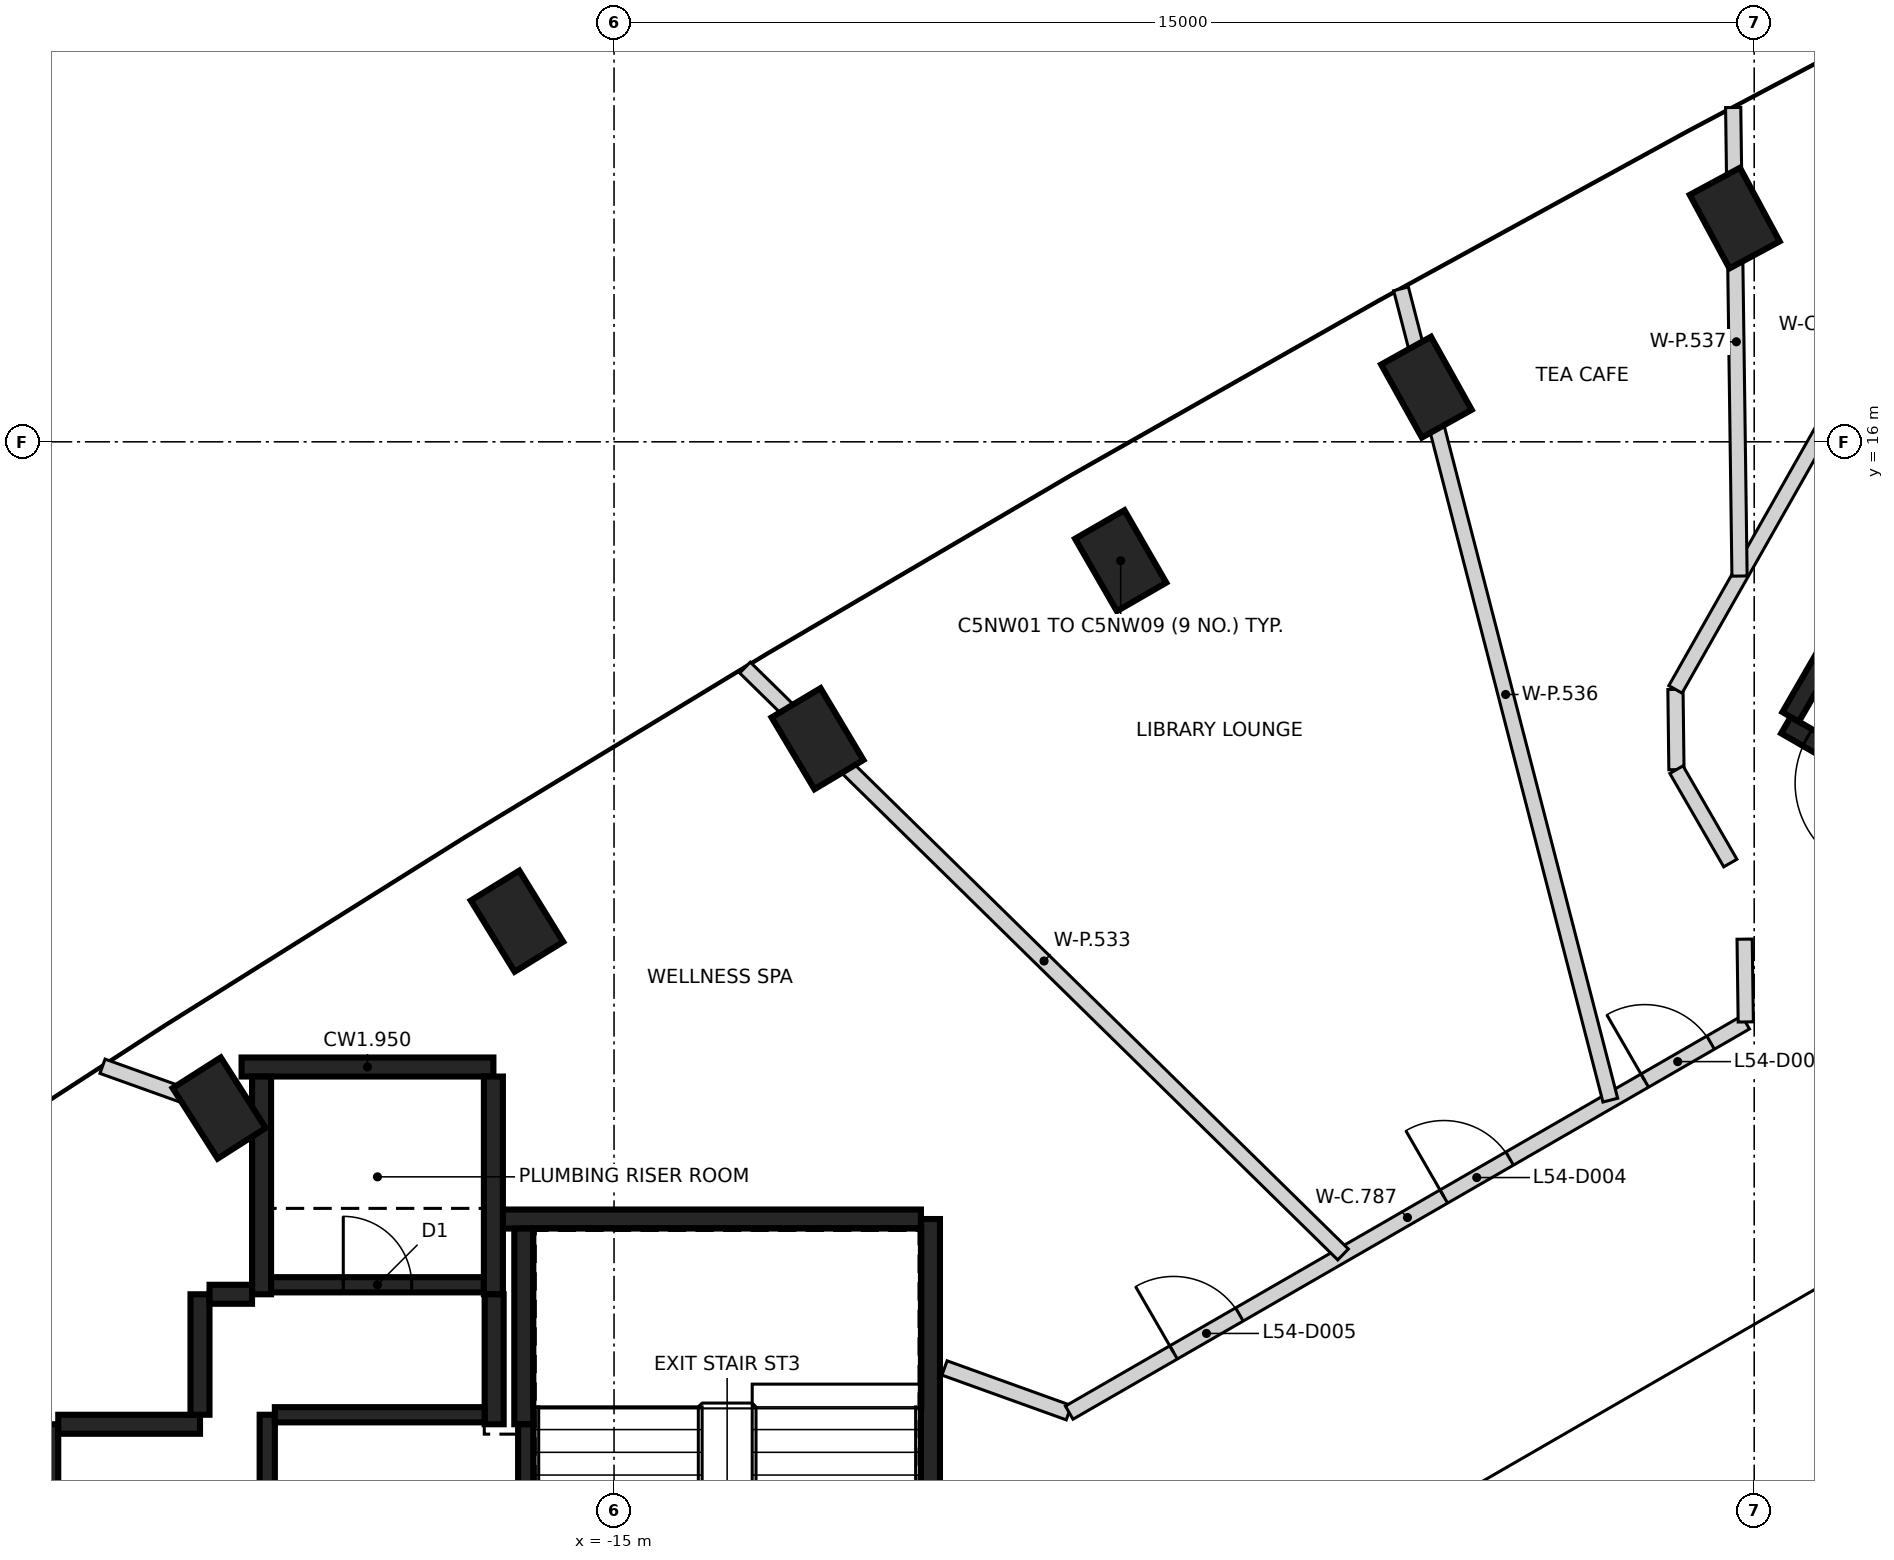
"""IFC4 building model, lengths in metres.
Left out: names, types, materials, properties, quantities, classifications, styles, units other than length and angle.
Written with IfcOpenShell. Run it as: python <this file> out.ifc"""

import sys

from ifc_helpers import new_model, si_unit, direction, frame, frame_2d, origin, origin_2d, place, context, subcontext, project, spatial, rectangle, extrude, element, fill, save


model = new_model("IFC4")
c1 = context("Model", 3, precision=1e-05, world=origin(), true_north=direction((0.0, 1.0)))
c2 = subcontext(c1, "Body", "Model", "MODEL_VIEW")
j1 = project(units=[si_unit("LENGTHUNIT", "METRE"), si_unit("PLANEANGLEUNIT", "RADIAN")], contexts=[c1])
p1 = place(None, origin())
s1 = spatial("IfcSite", under=j1, at=p1, CompositionType="ELEMENT")
p2 = place(p1, origin())
s2 = spatial("IfcBuilding", under=s1, at=p2, CompositionType="ELEMENT")
p3 = place(p2, frame((0.0, 0.0, 216.4)))
s3 = spatial("IfcBuildingStorey", under=s2, at=p3, CompositionType="ELEMENT", Elevation=216.4)
for number, where, z_axis, x_axis in (
    (1, (-0.256, 18.943, -0.35), (0.0, 0.0, 1.0), (-0.475, 0.88, 0.0)),
    (2, (-4.312, 16.719, -0.35), (0.0, 0.0, 1.0), (-0.487, 0.873, 0.0)),
    (3, (-8.335, 14.436, -0.35), (0.0, 0.0, 1.0), (-0.5, 0.866, 0.0)),
    (4, (-12.323, 12.094, -0.35), (0.0, 0.0, 1.0), (-0.513, 0.858, 0.0)),
    (5, (-16.277, 9.693, -0.35), (0.0, 0.0, 1.0), (-0.525, 0.851, 0.0)),
    (6, (-20.195, 7.235, -0.35), (0.0, 0.0, 1.0), (-0.538, 0.843, 0.0)),
):
    element("IfcColumn", number, at=place(p3, frame(where, z_axis=z_axis, x_axis=x_axis)), inside=s3, PredefinedType="COLUMN", context=c2, shape_type="SweptSolid", body=[
        extrude(rectangle(XDim=1.1, YDim=0.75, at=origin_2d()), origin(), (0.0, 0.0, 1.0), 5.0),
    ])
p4 = place(p3, frame((-10.837, 5.775, 0.0), z_axis=(0.0, 0.0, 1.0), x_axis=(0.0, -1.0, 0.0)))
e7 = element("IfcWall", 7, at=p4, inside=s3, PredefinedType="SHEAR", context=c2, shape_type="SweptSolid", body=[
    extrude(rectangle(XDim=11.55, YDim=0.25, at=frame_2d((5.775, 0.0))), origin(), (0.0, 0.0, 1.0), 4.65),
])
p5 = place(p4, frame((10.025, 0.0, 0.0)))
e8 = element("IfcOpeningElement", 8, at=p5, cuts=e7, PredefinedType="OPENING", context=c2, shape_type="SweptSolid", body=[
    extrude(rectangle(XDim=1.2, YDim=2.1, at=frame_2d((0.6, 1.05))), frame((0.0, 0.135, 0.0), z_axis=(0.0, -1.0, 0.0), x_axis=(1.0, 0.0, 0.0)), (0.0, 0.0, 1.0), 0.27),
])
p6 = place(p4, frame((8.725, 0.0, 0.0)))
e9 = element("IfcOpeningElement", 9, at=p6, cuts=e7, PredefinedType="OPENING", context=c2, shape_type="SweptSolid", body=[
    extrude(rectangle(XDim=1.2, YDim=2.1, at=frame_2d((0.6, 1.05))), frame((0.0, 0.135, 0.0), z_axis=(0.0, -1.0, 0.0), x_axis=(1.0, 0.0, 0.0)), (0.0, 0.0, 1.0), 0.27),
])
p7 = place(p3, frame((-22.437, -5.675, 0.0), z_axis=(0.0, 0.0, 1.0), x_axis=(0.0, 1.0, 0.0)))
e10 = element("IfcWall", 10, at=p7, inside=s3, PredefinedType="SHEAR", context=c2, shape_type="SweptSolid", body=[
    extrude(rectangle(XDim=8.75, YDim=0.25, at=frame_2d((4.375, 0.0))), origin(), (0.0, 0.0, 1.0), 4.65),
])
p8 = place(p3, frame((-16.472, 5.775, 0.0), z_axis=(0.0, 0.0, 1.0), x_axis=(1.0, 0.0, 0.0)))
e11 = element("IfcWall", 11, at=p8, inside=s3, PredefinedType="SHEAR", context=c2, shape_type="SweptSolid", body=[
    extrude(rectangle(XDim=5.51, YDim=0.25, at=frame_2d((2.755, 0.0))), origin(), (0.0, 0.0, 1.0), 4.65),
])
p9 = place(p3, frame((-19.9, 7.775, 0.0), z_axis=(0.0, 0.0, 1.0), x_axis=(1.0, 0.0, 0.0)))
e12 = element("IfcWall", 12, at=p9, inside=s3, PredefinedType="SHEAR", context=c2, shape_type="SweptSolid", body=[
    extrude(rectangle(XDim=3.313, YDim=0.25, at=frame_2d((1.656, 0.0))), origin(), (0.0, 0.0, 1.0), 4.65),
])
for number, where, z_axis, x_axis in (
    (13, (-16.587, 7.65, 0.0), (0.0, 0.0, 1.0), (0.0, -1.0, 0.0)),
    (14, (-19.637, 4.785, 0.0), (0.0, 0.0, 1.0), (0.0, 1.0, 0.0)),
):
    element("IfcWall", number, at=place(p3, frame(where, z_axis=z_axis, x_axis=x_axis)), inside=s3, PredefinedType="SHEAR", context=c2, shape_type="SweptSolid", body=[
        extrude(rectangle(XDim=2.865, YDim=0.25, at=frame_2d((1.432, 0.0))), origin(), (0.0, 0.0, 1.0), 4.65),
    ])
p10 = place(p3, frame((-16.187, 3.075, 0.0), z_axis=(0.0, 0.0, 1.0), x_axis=(0.0, 1.0, 0.0)))
e15 = element("IfcWall", 15, at=p10, inside=s3, PredefinedType="SHEAR", context=c2, shape_type="SweptSolid", body=[
    extrude(rectangle(XDim=2.575, YDim=0.25, at=frame_2d((1.287, 0.0))), origin(), (0.0, 0.0, 1.0), 4.65),
])
p11 = place(p3, frame((-22.312, 3.075, 0.0), z_axis=(0.0, 0.0, 1.0), x_axis=(1.0, 0.0, 0.0)))
e16 = element("IfcWall", 16, at=p11, inside=s3, PredefinedType="SHEAR", context=c2, shape_type="SweptSolid", body=[
    extrude(rectangle(XDim=1.865, YDim=0.25, at=frame_2d((0.932, 0.0))), origin(), (0.0, 0.0, 1.0), 4.65),
])
p12 = place(p3, frame((-16.577, 4.785, 0.0), z_axis=(0.0, 0.0, 1.0), x_axis=(0.0, -1.0, 0.0)))
e17 = element("IfcWall", 17, at=p12, inside=s3, PredefinedType="SHEAR", context=c2, shape_type="SweptSolid", body=[
    extrude(rectangle(XDim=1.71, YDim=0.25, at=frame_2d((0.855, 0.0))), origin(), (0.0, 0.0, 1.0), 4.65),
])
p13 = place(p3, frame((-20.447, 3.2, 0.0), z_axis=(0.0, 0.0, 1.0), x_axis=(0.0, 1.0, 0.0)))
e18 = element("IfcWall", 18, at=p13, inside=s3, PredefinedType="SHEAR", context=c2, shape_type="SweptSolid", body=[
    extrude(rectangle(XDim=1.584, YDim=0.25, at=frame_2d((0.792, 0.0))), origin(), (0.0, 0.0, 1.0), 4.65),
])
p14 = place(p3, frame((-20.322, 4.785, 0.0), z_axis=(0.0, 0.0, 1.0), x_axis=(1.0, 0.0, 0.0)))
e19 = element("IfcWall", 19, at=p14, inside=s3, PredefinedType="SHEAR", context=c2, shape_type="SweptSolid", body=[
    extrude(rectangle(XDim=0.559, YDim=0.25, at=frame_2d((0.28, 0.0))), origin(), (0.0, 0.0, 1.0), 4.65),
])
p15 = place(p3, frame((-16.162, 3.074, 0.0), z_axis=(0.0, 0.0, 1.0), x_axis=(0.0, -1.0, 0.0)))
e20 = element("IfcWall", 20, at=p15, inside=s3, PredefinedType="SHEAR", context=c2, shape_type="SweptSolid", body=[
    extrude(rectangle(XDim=5.974, YDim=0.2, at=frame_2d((2.987, 0.0))), origin(), (0.0, 0.0, 1.0), 4.65),
])
p16 = place(p3, frame((-19.562, -2.9, 0.0), z_axis=(0.0, 0.0, 1.0), x_axis=(0.0, 1.0, 0.0)))
e21 = element("IfcWall", 21, at=p16, inside=s3, PredefinedType="SHEAR", context=c2, shape_type="SweptSolid", body=[
    extrude(rectangle(XDim=6.1, YDim=0.2, at=frame_2d((3.05, 0.0))), origin(), (0.0, 0.0, 1.0), 4.65),
])
p17 = place(p3, frame((-19.511, 4.91, 0.0), z_axis=(0.0, 0.0, 1.0), x_axis=(1.0, 0.0, 0.0)))
e22 = element("IfcWall", 22, at=p17, inside=s3, PredefinedType="SHEAR", context=c2, shape_type="SweptSolid", body=[
    extrude(rectangle(XDim=2.798, YDim=0.2, at=frame_2d((1.399, 0.0))), origin(), (0.0, 0.0, 1.0), 4.65),
])
p18 = place(p17, frame((0.949, 0.0, 0.0)))
e23 = element("IfcOpeningElement", 23, at=p18, cuts=e22, PredefinedType="OPENING", context=c2, shape_type="SweptSolid", body=[
    extrude(rectangle(XDim=0.9, YDim=2.1, at=frame_2d((0.45, 1.05))), frame((0.0, 0.11, 0.0), z_axis=(0.0, -1.0, 0.0), x_axis=(1.0, 0.0, 0.0)), (0.0, 0.0, 1.0), 0.22),
])
p19 = place(p3, frame((-19.462, 3.2, 0.0), z_axis=(0.0, 0.0, 1.0), x_axis=(1.0, 0.0, 0.0)))
e24 = element("IfcWall", 24, at=p19, inside=s3, PredefinedType="SHEAR", context=c2, shape_type="SweptSolid", body=[
    extrude(rectangle(XDim=2.759, YDim=0.2, at=frame_2d((1.379, 0.0))), origin(), (0.0, 0.0, 1.0), 4.65),
])
p20 = place(p3, frame((10.42, 6.498, 0.0), z_axis=(0.0, 0.0, 1.0), x_axis=(-0.866021906294, 0.500006057782, 0.0)))
e25 = element("IfcWall", 25, at=p20, inside=s3, PredefinedType="SHEAR", context=c2, shape_type="SweptSolid", body=[
    extrude(rectangle(XDim=11.55, YDim=0.25, at=frame_2d((5.775, 0.0))), origin(), (0.0, 0.0, 1.0), 4.65),
])
p21 = place(p20, frame((10.025, 0.0, 0.0)))
e26 = element("IfcOpeningElement", 26, at=p21, cuts=e25, PredefinedType="OPENING", context=c2, shape_type="SweptSolid", body=[
    extrude(rectangle(XDim=1.2, YDim=2.1, at=frame_2d((0.6, 1.05))), frame((0.0, 0.135, 0.0), z_axis=(0.0, -1.0, 0.0), x_axis=(1.0, 0.0, 0.0)), (0.0, 0.0, 1.0), 0.27),
])
p22 = place(p20, frame((8.725, 0.0, 0.0)))
e27 = element("IfcOpeningElement", 27, at=p22, cuts=e25, PredefinedType="OPENING", context=c2, shape_type="SweptSolid", body=[
    extrude(rectangle(XDim=1.2, YDim=2.1, at=frame_2d((0.6, 1.05))), frame((0.0, 0.135, 0.0), z_axis=(0.0, -1.0, 0.0), x_axis=(1.0, 0.0, 0.0)), (0.0, 0.0, 1.0), 0.27),
])
p23 = place(p3, frame((0.48, 12.381, 0.0), z_axis=(0.0, 0.0, 1.0), x_axis=(0.49999885962, 0.866026062182, 0.0)))
e28 = element("IfcWall", 28, at=p23, inside=s3, PredefinedType="SHEAR", context=c2, shape_type="SweptSolid", body=[
    extrude(rectangle(XDim=5.225, YDim=0.25, at=frame_2d((2.612, 0.0))), origin(), (0.0, 0.0, 1.0), 4.65),
])
p24 = place(p3, frame((-10.652, 3.816, 0.0), z_axis=(0.0, 0.0, 1.0), x_axis=(0.940899946508, -0.33868464781, 0.0)))
e29 = element("IfcWall", 29, at=p24, inside=s3, PredefinedType="PARTITIONING", context=c2, shape_type="SweptSolid", body=[
    extrude(rectangle(XDim=1.738, YDim=0.2, at=frame_2d((0.869, 0.0))), origin(), (0.0, 0.0, 1.0), 4.65),
])
p25 = place(p3, frame((-9.012, 3.228, 0.0), z_axis=(0.0, 0.0, 1.0), x_axis=(0.866203386391, 0.499691598294, 0.0)))
e30 = element("IfcWall", 30, at=p25, inside=s3, PredefinedType="PARTITIONING", context=c2, shape_type="SweptSolid", body=[
    extrude(rectangle(XDim=10.275, YDim=0.2, at=frame_2d((5.137, 0.0))), origin(), (0.0, 0.0, 1.0), 4.65),
])
p26 = place(p25, frame((8.742, 0.0, 0.0)))
e31 = element("IfcOpeningElement", 31, at=p26, cuts=e30, PredefinedType="OPENING", context=c2, shape_type="SweptSolid", body=[
    extrude(rectangle(XDim=1.0, YDim=2.1, at=frame_2d((0.5, 1.05))), frame((0.0, 0.11, 0.0), z_axis=(0.0, -1.0, 0.0), x_axis=(1.0, 0.0, 0.0)), (0.0, 0.0, 1.0), 0.22),
])
p27 = place(p25, frame((5.69, 0.0, 0.0)))
e32 = element("IfcOpeningElement", 32, at=p27, cuts=e30, PredefinedType="OPENING", context=c2, shape_type="SweptSolid", body=[
    extrude(rectangle(XDim=1.0, YDim=2.1, at=frame_2d((0.5, 1.05))), frame((0.0, 0.11, 0.0), z_axis=(0.0, -1.0, 0.0), x_axis=(1.0, 0.0, 0.0)), (0.0, 0.0, 1.0), 0.22),
])
p28 = place(p25, frame((1.585, 0.0, 0.0)))
e33 = element("IfcOpeningElement", 33, at=p28, cuts=e30, PredefinedType="OPENING", context=c2, shape_type="SweptSolid", body=[
    extrude(rectangle(XDim=1.0, YDim=2.1, at=frame_2d((0.5, 1.05))), frame((0.0, 0.11, 0.0), z_axis=(0.0, -1.0, 0.0), x_axis=(1.0, 0.0, 0.0)), (0.0, 0.0, 1.0), 0.22),
])
p29 = place(p3, frame((-1.036, 12.743, 0.0), z_axis=(0.0, 0.0, 1.0), x_axis=(0.012253415255, -0.999924924089, 0.0)))
e34 = element("IfcWall", 34, at=p29, inside=s3, PredefinedType="PARTITIONING", context=c2, shape_type="SweptSolid", body=[
    extrude(rectangle(XDim=1.056, YDim=0.2, at=frame_2d((0.528, 0.0))), origin(), (0.0, 0.0, 1.0), 4.65),
])
p30 = place(p3, frame((-1.036, 12.743, 0.0), z_axis=(0.0, 0.0, 1.0), x_axis=(0.49314672747, 0.869946150739, 0.0)))
e35 = element("IfcWall", 35, at=p30, inside=s3, PredefinedType="PARTITIONING", context=c2, shape_type="SweptSolid", body=[
    extrude(rectangle(XDim=10.423, YDim=0.2, at=frame_2d((5.211, 0.0))), origin(), (0.0, 0.0, 1.0), 3.75),
])
p31 = place(p30, frame((5.612, 0.0, 0.0)))
e36 = element("IfcOpeningElement", 36, at=p31, cuts=e35, PredefinedType="OPENING", context=c2, shape_type="SweptSolid", body=[
    extrude(rectangle(XDim=0.9, YDim=2.1, at=frame_2d((0.45, 1.05))), frame((0.0, 0.11, 0.0), z_axis=(0.0, -1.0, 0.0), x_axis=(1.0, 0.0, 0.0)), (0.0, 0.0, 1.0), 0.22),
])
p32 = place(p3, frame((-1.023, 11.687, 0.0), z_axis=(0.0, 0.0, 1.0), x_axis=(0.499692660748, -0.866202773486, 0.0)))
e37 = element("IfcWall", 37, at=p32, inside=s3, PredefinedType="PARTITIONING", context=c2, shape_type="SweptSolid", body=[
    extrude(rectangle(XDim=1.419, YDim=0.2, at=frame_2d((0.709, 0.0))), origin(), (0.0, 0.0, 1.0), 4.65),
])
p33 = place(p3, frame((-0.126, 9.457, 0.0), z_axis=(0.0, 0.0, 1.0), x_axis=(0.013672785902, -0.999906523094, 0.0)))
e38 = element("IfcWall", 38, at=p33, inside=s3, PredefinedType="PARTITIONING", context=c2, shape_type="SweptSolid", body=[
    extrude(rectangle(XDim=1.089, YDim=0.2, at=frame_2d((0.544, 0.0))), origin(), (0.0, 0.0, 1.0), 4.65),
])
p34 = place(p3, frame((-21.73, 7.785, 0.0), z_axis=(0.0, 0.0, 1.0), x_axis=(0.941449854418, -0.337153038866, 0.0)))
e39 = element("IfcWall", 39, at=p34, inside=s3, PredefinedType="PARTITIONING", context=c2, shape_type="SweptSolid", body=[
    extrude(rectangle(XDim=2.026, YDim=0.2, at=frame_2d((1.013, 0.0))), origin(), (0.0, 0.0, 1.0), 4.65),
])
p35 = place(p3, frame((-13.277, 13.03, 0.0), z_axis=(0.0, 0.0, 1.0), x_axis=(0.713763428774, -0.700386870054, 0.0)))
e40 = element("IfcWall", 40, at=p35, inside=s3, PredefinedType="PARTITIONING", context=c2, shape_type="SweptSolid", body=[
    extrude(rectangle(XDim=11.024, YDim=0.2, at=frame_2d((5.512, 0.0))), origin(), (0.0, 0.0, 1.0), 4.65),
])
p36 = place(p3, frame((-4.646, 18.013, 0.0), z_axis=(0.0, 0.0, 1.0), x_axis=(0.249782901113, -0.968301865283, 0.0)))
e41 = element("IfcWall", 41, at=p36, inside=s3, PredefinedType="PARTITIONING", context=c2, shape_type="SweptSolid", body=[
    extrude(rectangle(XDim=11.023, YDim=0.2, at=frame_2d((5.512, 0.0))), origin(), (0.0, 0.0, 1.0), 4.65),
])
p37 = place(p3, frame((-0.276, 20.398, 0.0), z_axis=(0.0, 0.0, 1.0), x_axis=(0.013504253847, -0.999908813407, 0.0)))
e42 = element("IfcWall", 42, at=p37, inside=s3, PredefinedType="PARTITIONING", context=c2, shape_type="SweptSolid", body=[
    extrude(rectangle(XDim=6.165, YDim=0.2, at=frame_2d((3.083, 0.0))), origin(), (0.0, 0.0, 1.0), 4.65),
])
p38 = place(p18, origin())
e43 = element("IfcDoor", 43, at=p38, inside=s3, OperationType="SINGLE_SWING_LEFT", PredefinedType="DOOR", context=c2, shape_type="SweptSolid", body=[
    extrude(rectangle(XDim=0.9, YDim=2.1, at=frame_2d((0.45, 1.05))), frame((0.0, 0.025, 0.0), z_axis=(0.0, -1.0, 0.0), x_axis=(1.0, 0.0, 0.0)), (0.0, 0.0, 1.0), 0.05),
])
fill(e23, e43)
p39 = place(p21, origin())
e44 = element("IfcDoor", 44, at=p39, inside=s3, OperationType="SINGLE_SWING_LEFT", PredefinedType="DOOR", context=c2, shape_type="SweptSolid", body=[
    extrude(rectangle(XDim=1.2, YDim=2.1, at=frame_2d((0.6, 1.05))), frame((0.0, 0.025, 0.0), z_axis=(0.0, -1.0, 0.0), x_axis=(1.0, 0.0, 0.0)), (0.0, 0.0, 1.0), 0.05),
])
fill(e26, e44)
p40 = place(p26, origin())
e45 = element("IfcDoor", 45, at=p40, inside=s3, OperationType="SINGLE_SWING_LEFT", PredefinedType="DOOR", context=c2, shape_type="SweptSolid", body=[
    extrude(rectangle(XDim=1.0, YDim=2.1, at=frame_2d((0.5, 1.05))), frame((0.0, 0.025, 0.0), z_axis=(0.0, -1.0, 0.0), x_axis=(1.0, 0.0, 0.0)), (0.0, 0.0, 1.0), 0.05),
])
fill(e31, e45)
p41 = place(p27, origin())
e46 = element("IfcDoor", 46, at=p41, inside=s3, OperationType="SINGLE_SWING_LEFT", PredefinedType="DOOR", context=c2, shape_type="SweptSolid", body=[
    extrude(rectangle(XDim=1.0, YDim=2.1, at=frame_2d((0.5, 1.05))), frame((0.0, 0.025, 0.0), z_axis=(0.0, -1.0, 0.0), x_axis=(1.0, 0.0, 0.0)), (0.0, 0.0, 1.0), 0.05),
])
fill(e32, e46)
p42 = place(p28, origin())
e47 = element("IfcDoor", 47, at=p42, inside=s3, OperationType="SINGLE_SWING_LEFT", PredefinedType="DOOR", context=c2, shape_type="SweptSolid", body=[
    extrude(rectangle(XDim=1.0, YDim=2.1, at=frame_2d((0.5, 1.05))), frame((0.0, 0.025, 0.0), z_axis=(0.0, -1.0, 0.0), x_axis=(1.0, 0.0, 0.0)), (0.0, 0.0, 1.0), 0.05),
])
fill(e33, e47)
save(model, sys.argv[1])
